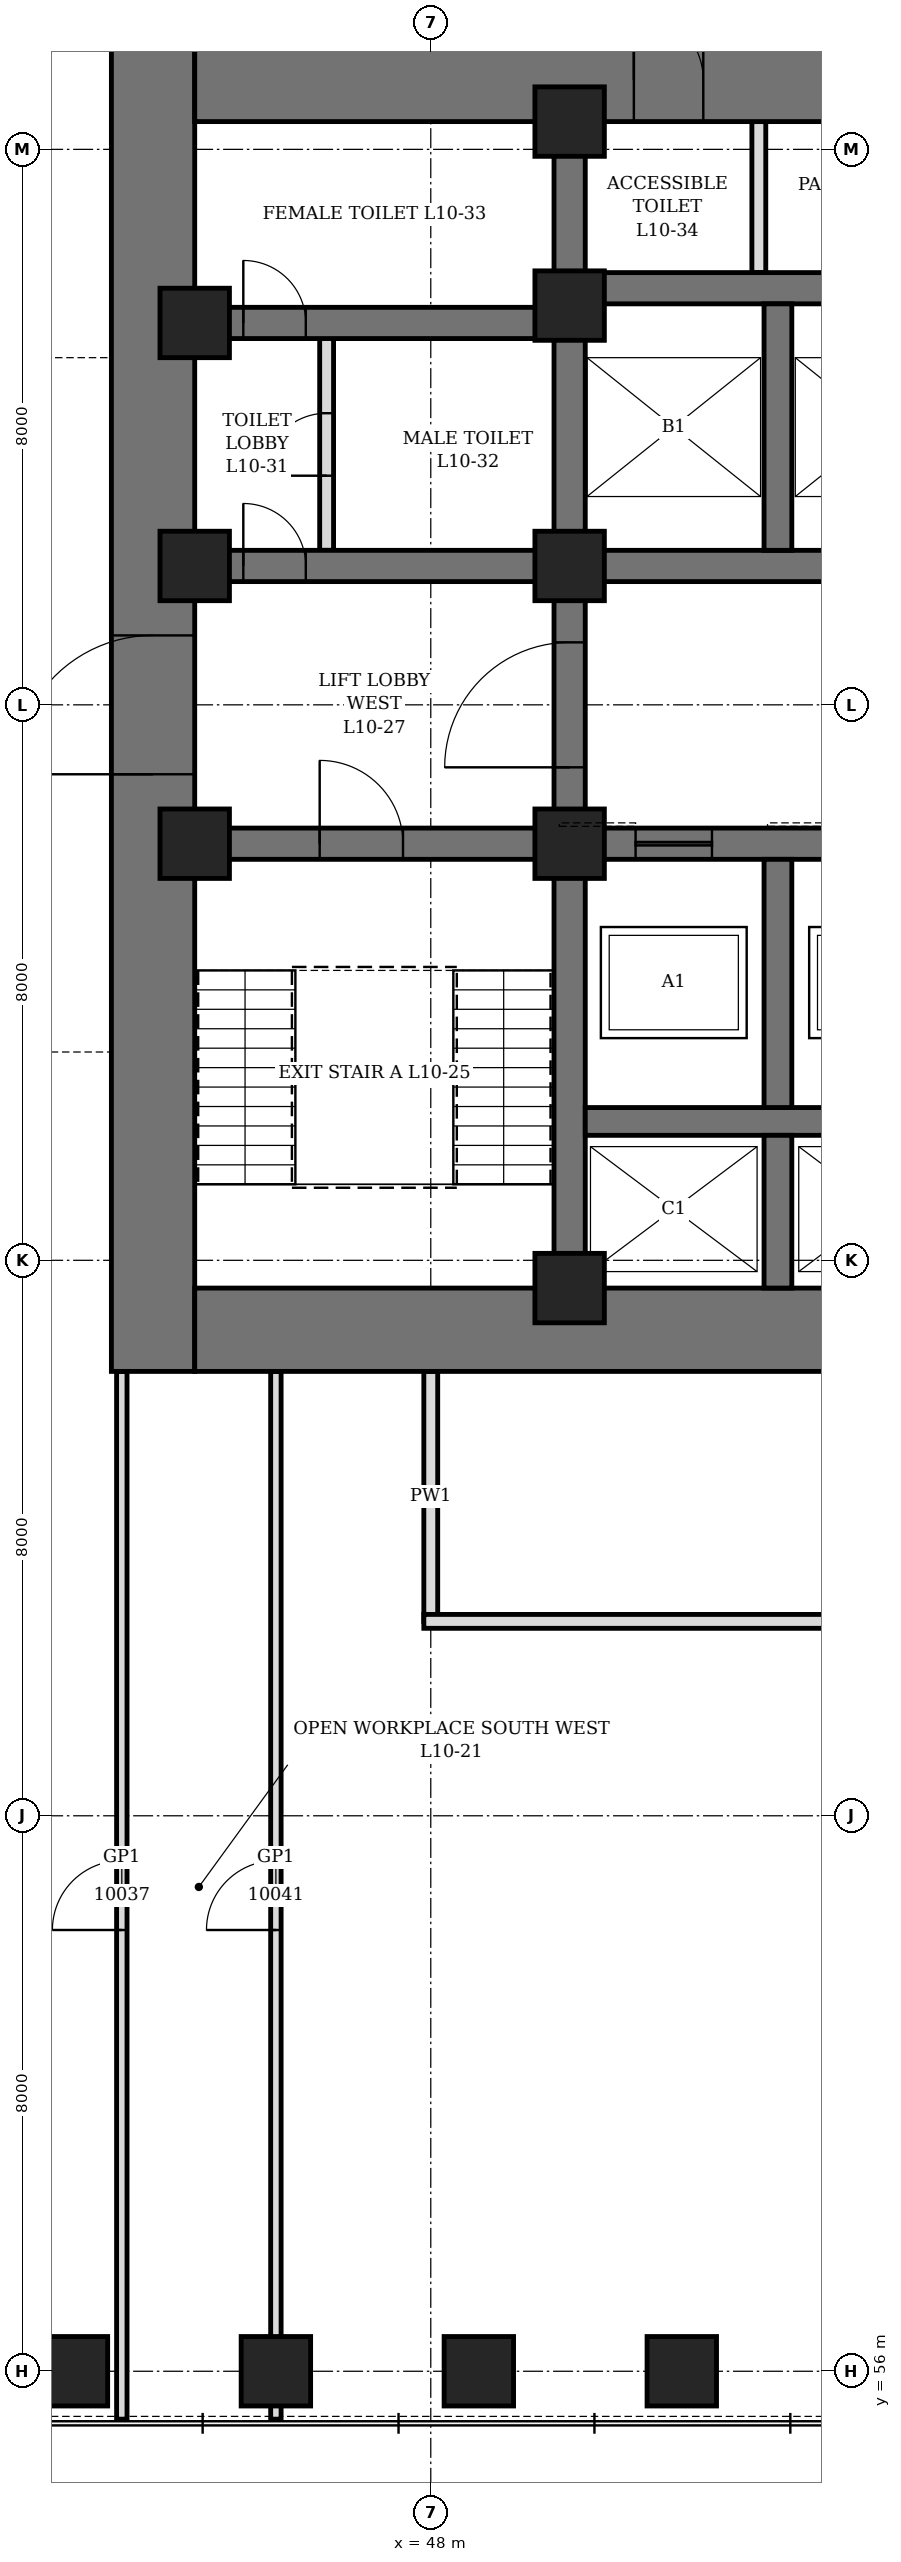
"""IFC4 building model, lengths in metres.
Left out: names, types, materials, properties, quantities, classifications, styles, units other than length and angle.
Written with IfcOpenShell. Run it as: python <this file> out.ifc"""

import sys

from ifc_helpers import new_model, si_unit, direction, frame, frame_2d, origin, origin_2d, place, context, subcontext, project, spatial, rectangle, hollow_rectangle, extrude, element, fill, save


model = new_model("IFC4")
c1 = context("Model", 3, precision=1e-05, world=origin(), true_north=direction((0.0, 1.0)))
c2 = subcontext(c1, "Body", "Model", "MODEL_VIEW")
j1 = project(units=[si_unit("LENGTHUNIT", "METRE"), si_unit("PLANEANGLEUNIT", "RADIAN")], contexts=[c1])
p1 = place(None, origin())
s1 = spatial("IfcSite", under=j1, at=p1, CompositionType="ELEMENT")
p2 = place(p1, origin())
s2 = spatial("IfcBuilding", under=s1, at=p2, CompositionType="ELEMENT")
p3 = place(p2, frame((0.0, 0.0, 51.7)))
s3 = spatial("IfcBuildingStorey", under=s2, at=p3, CompositionType="ELEMENT", Elevation=51.7)
for number, where, z_axis, x_axis in (
    (1, (42.846, 56.0, 0.0), (0.0, 0.0, 1.0), (1.0, 0.0, 0.0)),
    (2, (45.769, 56.0, 0.0), (0.0, 0.0, 1.0), (1.0, 0.0, 0.0)),
    (3, (48.692, 56.0, 0.0), (0.0, 0.0, 1.0), (1.0, 0.0, 0.0)),
    (4, (51.615, 56.0, 0.0), (0.0, 0.0, 1.0), (1.0, 0.0, 0.0)),
):
    element("IfcColumn", number, at=place(p3, frame(where, z_axis=z_axis, x_axis=x_axis)), inside=s3, PredefinedType="COLUMN", context=c2, shape_type="SweptSolid", body=[
        extrude(hollow_rectangle(XDim=1.0, YDim=1.0, WallThickness=0.25, at=origin_2d()), origin(), (0.0, 0.0, 1.0), 4.2),
    ])
p4 = place(p3, frame((44.0, 70.4, 0.0), z_axis=(0.0, 0.0, 1.0), x_axis=(0.0, 1.0, 0.0)))
e5 = element("IfcWall", 5, at=p4, inside=s3, PredefinedType="SHEAR", context=c2, shape_type="SweptSolid", body=[
    extrude(rectangle(XDim=19.2, YDim=1.2, at=frame_2d((9.6, 0.0))), origin(), (0.0, 0.0, 1.0), 4.2),
])
p5 = place(p4, frame((8.6, 0.0, 0.0)))
e6 = element("IfcOpeningElement", 6, at=p5, cuts=e5, PredefinedType="OPENING", context=c2, shape_type="SweptSolid", body=[
    extrude(rectangle(XDim=2.0, YDim=2.4, at=frame_2d((1.0, 1.2))), frame((0.0, 0.61, 0.0), z_axis=(0.0, -1.0, 0.0), x_axis=(1.0, 0.0, 0.0)), (0.0, 0.0, 1.0), 1.22),
])
p6 = place(p3, frame((44.6, 71.0, 0.0), z_axis=(0.0, 0.0, 1.0), x_axis=(1.0, 0.0, 0.0)))
e7 = element("IfcWall", 7, at=p6, inside=s3, PredefinedType="SHEAR", context=c2, shape_type="SweptSolid", body=[
    extrude(rectangle(XDim=22.8, YDim=1.2, at=frame_2d((11.4, 0.0))), origin(), (0.0, 0.0, 1.0), 4.2),
])
p7 = place(p3, frame((44.6, 89.0, 0.0), z_axis=(0.0, 0.0, 1.0), x_axis=(1.0, 0.0, 0.0)))
e8 = element("IfcWall", 8, at=p7, inside=s3, PredefinedType="SHEAR", context=c2, shape_type="SweptSolid", body=[
    extrude(rectangle(XDim=22.8, YDim=1.2, at=frame_2d((11.4, 0.0))), origin(), (0.0, 0.0, 1.0), 4.2),
])
p8 = place(p7, frame((6.325, 0.0, 0.0)))
e9 = element("IfcOpeningElement", 9, at=p8, cuts=e8, PredefinedType="OPENING", context=c2, shape_type="SweptSolid", body=[
    extrude(rectangle(XDim=1.0, YDim=2.1, at=frame_2d((0.5, 1.05))), frame((0.0, 0.61, 0.0), z_axis=(0.0, -1.0, 0.0), x_axis=(1.0, 0.0, 0.0)), (0.0, 0.0, 1.0), 1.22),
])
p9 = place(p7, frame((9.25, 0.0, 0.0)))
e10 = element("IfcOpeningElement", 10, at=p9, cuts=e8, PredefinedType="OPENING", context=c2, shape_type="SweptSolid", body=[
    extrude(rectangle(XDim=0.9, YDim=2.1, at=frame_2d((0.45, 1.05))), frame((0.0, 0.61, 0.0), z_axis=(0.0, -1.0, 0.0), x_axis=(1.0, 0.0, 0.0)), (0.0, 0.0, 1.0), 1.22),
])
p10 = place(p7, frame((12.025, 0.0, 0.0)))
e11 = element("IfcOpeningElement", 11, at=p10, cuts=e8, PredefinedType="OPENING", context=c2, shape_type="SweptSolid", body=[
    extrude(rectangle(XDim=0.9, YDim=2.1, at=frame_2d((0.45, 1.05))), frame((0.0, 0.61, 0.0), z_axis=(0.0, -1.0, 0.0), x_axis=(1.0, 0.0, 0.0)), (0.0, 0.0, 1.0), 1.22),
])
p11 = place(p7, frame((13.962, 0.0, 0.0)))
e12 = element("IfcOpeningElement", 12, at=p11, cuts=e8, PredefinedType="OPENING", context=c2, shape_type="SweptSolid", body=[
    extrude(rectangle(XDim=0.9, YDim=2.1, at=frame_2d((0.45, 1.05))), frame((0.0, 0.61, 0.0), z_axis=(0.0, -1.0, 0.0), x_axis=(1.0, 0.0, 0.0)), (0.0, 0.0, 1.0), 1.22),
])
p12 = place(p3, frame((50.0, 71.6, 0.0), z_axis=(0.0, 0.0, 1.0), x_axis=(0.0, 1.0, 0.0)))
e13 = element("IfcWall", 13, at=p12, inside=s3, PredefinedType="SHEAR", context=c2, shape_type="SweptSolid", body=[
    extrude(rectangle(XDim=16.8, YDim=0.45, at=frame_2d((8.4, 0.0))), origin(), (0.0, 0.0, 1.0), 4.2),
])
p13 = place(p12, frame((7.5, 0.0, 0.0)))
e14 = element("IfcOpeningElement", 14, at=p13, cuts=e13, PredefinedType="OPENING", context=c2, shape_type="SweptSolid", body=[
    extrude(rectangle(XDim=1.8, YDim=2.4, at=frame_2d((0.9, 1.2))), frame((0.0, 0.235, 0.0), z_axis=(0.0, -1.0, 0.0), x_axis=(1.0, 0.0, 0.0)), (0.0, 0.0, 1.0), 0.47),
])
p14 = place(p3, frame((44.6, 78.0, 0.0), z_axis=(0.0, 0.0, 1.0), x_axis=(1.0, 0.0, 0.0)))
e15 = element("IfcWall", 15, at=p14, inside=s3, PredefinedType="SHEAR", context=c2, shape_type="SweptSolid", body=[
    extrude(rectangle(XDim=5.175, YDim=0.45, at=frame_2d((2.587, 0.0))), origin(), (0.0, 0.0, 1.0), 4.2),
])
p15 = place(p14, frame((1.8, 0.0, 0.0)))
e16 = element("IfcOpeningElement", 16, at=p15, cuts=e15, PredefinedType="OPENING", context=c2, shape_type="SweptSolid", body=[
    extrude(rectangle(XDim=1.2, YDim=2.1, at=frame_2d((0.6, 1.05))), frame((0.0, 0.235, 0.0), z_axis=(0.0, -1.0, 0.0), x_axis=(1.0, 0.0, 0.0)), (0.0, 0.0, 1.0), 0.47),
])
p16 = place(p3, frame((44.6, 82.0, 0.0), z_axis=(0.0, 0.0, 1.0), x_axis=(1.0, 0.0, 0.0)))
e17 = element("IfcWall", 17, at=p16, inside=s3, PredefinedType="SHEAR", context=c2, shape_type="SweptSolid", body=[
    extrude(rectangle(XDim=5.175, YDim=0.45, at=frame_2d((2.587, 0.0))), origin(), (0.0, 0.0, 1.0), 4.2),
])
p17 = place(p16, frame((0.7, 0.0, 0.0)))
e18 = element("IfcOpeningElement", 18, at=p17, cuts=e17, PredefinedType="OPENING", context=c2, shape_type="SweptSolid", body=[
    extrude(rectangle(XDim=0.9, YDim=2.1, at=frame_2d((0.45, 1.05))), frame((0.0, 0.235, 0.0), z_axis=(0.0, -1.0, 0.0), x_axis=(1.0, 0.0, 0.0)), (0.0, 0.0, 1.0), 0.47),
])
p18 = place(p3, frame((44.6, 85.5, 0.0), z_axis=(0.0, 0.0, 1.0), x_axis=(1.0, 0.0, 0.0)))
e19 = element("IfcWall", 19, at=p18, inside=s3, PredefinedType="SHEAR", context=c2, shape_type="SweptSolid", body=[
    extrude(rectangle(XDim=5.175, YDim=0.45, at=frame_2d((2.587, 0.0))), origin(), (0.0, 0.0, 1.0), 4.2),
])
p19 = place(p18, frame((0.7, 0.0, 0.0)))
e20 = element("IfcOpeningElement", 20, at=p19, cuts=e19, PredefinedType="OPENING", context=c2, shape_type="SweptSolid", body=[
    extrude(rectangle(XDim=0.9, YDim=2.1, at=frame_2d((0.45, 1.05))), frame((0.0, 0.235, 0.0), z_axis=(0.0, -1.0, 0.0), x_axis=(1.0, 0.0, 0.0)), (0.0, 0.0, 1.0), 0.47),
])
p20 = place(p3, frame((50.225, 78.0, 0.0), z_axis=(0.0, 0.0, 1.0), x_axis=(1.0, 0.0, 0.0)))
e21 = element("IfcWall", 21, at=p20, inside=s3, PredefinedType="SHEAR", context=c2, shape_type="SweptSolid", body=[
    extrude(rectangle(XDim=11.55, YDim=0.45, at=frame_2d((5.775, 0.0))), origin(), (0.0, 0.0, 1.0), 4.2),
])
p21 = place(p20, frame((0.725, 0.0, 0.0)))
e22 = element("IfcOpeningElement", 22, at=p21, cuts=e21, PredefinedType="OPENING", context=c2, shape_type="SweptSolid", body=[
    extrude(rectangle(XDim=1.1, YDim=2.2, at=frame_2d((0.55, 1.1))), frame((0.0, 0.235, 0.0), z_axis=(0.0, -1.0, 0.0), x_axis=(1.0, 0.0, 0.0)), (0.0, 0.0, 1.0), 0.47),
])
p22 = place(p20, frame((3.725, 0.0, 0.0)))
e23 = element("IfcOpeningElement", 23, at=p22, cuts=e21, PredefinedType="OPENING", context=c2, shape_type="SweptSolid", body=[
    extrude(rectangle(XDim=1.1, YDim=2.2, at=frame_2d((0.55, 1.1))), frame((0.0, 0.235, 0.0), z_axis=(0.0, -1.0, 0.0), x_axis=(1.0, 0.0, 0.0)), (0.0, 0.0, 1.0), 0.47),
])
p23 = place(p20, frame((6.725, 0.0, 0.0)))
e24 = element("IfcOpeningElement", 24, at=p23, cuts=e21, PredefinedType="OPENING", context=c2, shape_type="SweptSolid", body=[
    extrude(rectangle(XDim=1.1, YDim=2.2, at=frame_2d((0.55, 1.1))), frame((0.0, 0.235, 0.0), z_axis=(0.0, -1.0, 0.0), x_axis=(1.0, 0.0, 0.0)), (0.0, 0.0, 1.0), 0.47),
])
p24 = place(p20, frame((9.725, 0.0, 0.0)))
e25 = element("IfcOpeningElement", 25, at=p24, cuts=e21, PredefinedType="OPENING", context=c2, shape_type="SweptSolid", body=[
    extrude(rectangle(XDim=1.1, YDim=2.2, at=frame_2d((0.55, 1.1))), frame((0.0, 0.235, 0.0), z_axis=(0.0, -1.0, 0.0), x_axis=(1.0, 0.0, 0.0)), (0.0, 0.0, 1.0), 0.47),
])
for number, where, z_axis, x_axis in (
    (26, (50.225, 82.0, 0.0), (0.0, 0.0, 1.0), (1.0, 0.0, 0.0)),
    (27, (50.225, 86.0, 0.0), (0.0, 0.0, 1.0), (1.0, 0.0, 0.0)),
):
    element("IfcWall", number, at=place(p3, frame(where, z_axis=z_axis, x_axis=x_axis)), inside=s3, PredefinedType="SHEAR", context=c2, shape_type="SweptSolid", body=[
        extrude(rectangle(XDim=11.55, YDim=0.45, at=frame_2d((5.775, 0.0))), origin(), (0.0, 0.0, 1.0), 4.2),
    ])
p25 = place(p3, frame((50.225, 74.0, 0.0), z_axis=(0.0, 0.0, 1.0), x_axis=(1.0, 0.0, 0.0)))
e28 = element("IfcWall", 28, at=p25, inside=s3, PredefinedType="SHEAR", context=c2, shape_type="SweptSolid", body=[
    extrude(rectangle(XDim=11.55, YDim=0.4, at=frame_2d((5.775, 0.0))), origin(), (0.0, 0.0, 1.0), 4.2),
])
p26 = place(p3, frame((53.0, 71.6, 0.0), z_axis=(0.0, 0.0, 1.0), x_axis=(0.0, 1.0, 0.0)))
e29 = element("IfcWall", 29, at=p26, inside=s3, PredefinedType="SHEAR", context=c2, shape_type="SweptSolid", body=[
    extrude(rectangle(XDim=2.2, YDim=0.4, at=frame_2d((1.1, 0.0))), origin(), (0.0, 0.0, 1.0), 4.2),
])
p27 = place(p3, frame((53.0, 74.2, 0.0), z_axis=(0.0, 0.0, 1.0), x_axis=(0.0, 1.0, 0.0)))
e30 = element("IfcWall", 30, at=p27, inside=s3, PredefinedType="SHEAR", context=c2, shape_type="SweptSolid", body=[
    extrude(rectangle(XDim=3.575, YDim=0.4, at=frame_2d((1.788, 0.0))), origin(), (0.0, 0.0, 1.0), 4.2),
])
p28 = place(p3, frame((53.0, 82.225, 0.0), z_axis=(0.0, 0.0, 1.0), x_axis=(0.0, 1.0, 0.0)))
e31 = element("IfcWall", 31, at=p28, inside=s3, PredefinedType="SHEAR", context=c2, shape_type="SweptSolid", body=[
    extrude(rectangle(XDim=3.55, YDim=0.4, at=frame_2d((1.775, 0.0))), origin(), (0.0, 0.0, 1.0), 4.2),
])
for number, where, z_axis, x_axis in (
    (32, (44.6, 78.0, 0.0), (0.0, 0.0, 1.0), (1.0, 0.0, 0.0)),
    (33, (44.6, 82.0, 0.0), (0.0, 0.0, 1.0), (1.0, 0.0, 0.0)),
    (34, (44.6, 85.5, 0.0), (0.0, 0.0, 1.0), (1.0, 0.0, 0.0)),
    (35, (50.0, 71.6, 0.0), (0.0, 0.0, 1.0), (1.0, 0.0, 0.0)),
    (36, (50.0, 78.0, 0.0), (0.0, 0.0, 1.0), (1.0, 0.0, 0.0)),
    (37, (50.0, 82.0, 0.0), (0.0, 0.0, 1.0), (1.0, 0.0, 0.0)),
    (38, (50.0, 85.75, 0.0), (0.0, 0.0, 1.0), (1.0, 0.0, 0.0)),
    (39, (50.0, 88.4, 0.0), (0.0, 0.0, 1.0), (1.0, 0.0, 0.0)),
):
    element("IfcColumn", number, at=place(p3, frame(where, z_axis=z_axis, x_axis=x_axis)), inside=s3, PredefinedType="COLUMN", context=c2, shape_type="SweptSolid", body=[
        extrude(hollow_rectangle(XDim=1.0, YDim=1.0, WallThickness=0.15, at=origin_2d()), origin(), (0.0, 0.0, 1.0), 4.2),
    ])
p29 = place(p3, frame((46.5, 82.225, 0.0), z_axis=(0.0, 0.0, 1.0), x_axis=(0.0, 1.0, 0.0)))
e40 = element("IfcWall", 40, at=p29, inside=s3, PredefinedType="PARTITIONING", context=c2, shape_type="SweptSolid", body=[
    extrude(rectangle(XDim=3.05, YDim=0.2, at=frame_2d((1.525, 0.0))), origin(), (0.0, 0.0, 1.0), 4.04),
])
p30 = place(p29, frame((1.075, 0.0, 0.0)))
e41 = element("IfcOpeningElement", 41, at=p30, cuts=e40, PredefinedType="OPENING", context=c2, shape_type="SweptSolid", body=[
    extrude(rectangle(XDim=0.9, YDim=2.1, at=frame_2d((0.45, 1.05))), frame((0.0, 0.11, 0.0), z_axis=(0.0, -1.0, 0.0), x_axis=(1.0, 0.0, 0.0)), (0.0, 0.0, 1.0), 0.22),
])
p31 = place(p3, frame((52.725, 86.225, 0.0), z_axis=(0.0, 0.0, 1.0), x_axis=(0.0, 1.0, 0.0)))
e42 = element("IfcWall", 42, at=p31, inside=s3, PredefinedType="PARTITIONING", context=c2, shape_type="SweptSolid", body=[
    extrude(rectangle(XDim=2.175, YDim=0.2, at=frame_2d((1.087, 0.0))), origin(), (0.0, 0.0, 1.0), 4.04),
])
p32 = place(p3, frame((48.0, 66.8, 0.0), z_axis=(0.0, 0.0, 1.0), x_axis=(0.0, 1.0, 0.0)))
e43 = element("IfcWall", 43, at=p32, inside=s3, PredefinedType="PARTITIONING", context=c2, shape_type="SweptSolid", body=[
    extrude(rectangle(XDim=3.6, YDim=0.2, at=frame_2d((1.8, 0.0))), origin(), (0.0, 0.0, 1.0), 4.04),
])
p33 = place(p3, frame((47.9, 66.8, 0.0), z_axis=(0.0, 0.0, 1.0), x_axis=(1.0, 0.0, 0.0)))
e44 = element("IfcWall", 44, at=p33, inside=s3, PredefinedType="PARTITIONING", context=c2, shape_type="SweptSolid", body=[
    extrude(rectangle(XDim=16.2, YDim=0.2, at=frame_2d((8.1, 0.0))), origin(), (0.0, 0.0, 1.0), 4.04),
])
p34 = place(p33, frame((7.6, 0.0, 0.0)))
e45 = element("IfcOpeningElement", 45, at=p34, cuts=e44, PredefinedType="OPENING", context=c2, shape_type="SweptSolid", body=[
    extrude(rectangle(XDim=1.0, YDim=2.1, at=frame_2d((0.5, 1.05))), frame((0.0, 0.11, 0.0), z_axis=(0.0, -1.0, 0.0), x_axis=(1.0, 0.0, 0.0)), (0.0, 0.0, 1.0), 0.22),
])
p35 = place(p3, frame((43.55, 55.31, 0.0), z_axis=(0.0, 0.0, 1.0), x_axis=(0.0, 1.0, 0.0)))
e46 = element("IfcWall", 46, at=p35, inside=s3, PredefinedType="PARTITIONING", context=c2, shape_type="SweptSolid", body=[
    extrude(rectangle(XDim=15.09, YDim=0.15, at=frame_2d((7.545, 0.0))), origin(), (0.0, 0.0, 1.0), 4.04),
])
p36 = place(p35, frame((7.045, 0.0, 0.0)))
e47 = element("IfcOpeningElement", 47, at=p36, cuts=e46, PredefinedType="OPENING", context=c2, shape_type="SweptSolid", body=[
    extrude(rectangle(XDim=1.0, YDim=2.4, at=frame_2d((0.5, 1.2))), frame((0.0, 0.085, 0.0), z_axis=(0.0, -1.0, 0.0), x_axis=(1.0, 0.0, 0.0)), (0.0, 0.0, 1.0), 0.17),
])
p37 = place(p3, frame((45.769, 55.31, 0.0), z_axis=(0.0, 0.0, 1.0), x_axis=(0.0, 1.0, 0.0)))
e48 = element("IfcWall", 48, at=p37, inside=s3, PredefinedType="PARTITIONING", context=c2, shape_type="SweptSolid", body=[
    extrude(rectangle(XDim=15.09, YDim=0.15, at=frame_2d((7.545, 0.0))), origin(), (0.0, 0.0, 1.0), 3.278),
])
p38 = place(p37, frame((7.045, 0.0, 0.0)))
e49 = element("IfcOpeningElement", 49, at=p38, cuts=e48, PredefinedType="OPENING", context=c2, shape_type="SweptSolid", body=[
    extrude(rectangle(XDim=1.0, YDim=2.4, at=frame_2d((0.5, 1.2))), frame((0.0, 0.085, 0.0), z_axis=(0.0, -1.0, 0.0), x_axis=(1.0, 0.0, 0.0)), (0.0, 0.0, 1.0), 0.17),
])
p39 = place(p17, origin())
e50 = element("IfcDoor", 50, at=p39, inside=s3, OperationType="SINGLE_SWING_LEFT", PredefinedType="DOOR", context=c2, shape_type="SweptSolid", body=[
    extrude(rectangle(XDim=0.9, YDim=2.1, at=frame_2d((0.45, 1.05))), frame((0.0, 0.225, 0.0), z_axis=(0.0, -1.0, 0.0), x_axis=(1.0, 0.0, 0.0)), (0.0, 0.0, 1.0), 0.449),
])
fill(e18, e50)
p40 = place(p30, origin())
e51 = element("IfcDoor", 51, at=p40, inside=s3, OperationType="SINGLE_SWING_RIGHT", PredefinedType="DOOR", context=c2, shape_type="SweptSolid", body=[
    extrude(rectangle(XDim=0.9, YDim=2.1, at=frame_2d((0.45, 1.05))), frame((0.0, 0.1, 0.0), z_axis=(0.0, -1.0, 0.0), x_axis=(1.0, 0.0, 0.0)), (0.0, 0.0, 1.0), 0.199),
])
fill(e41, e51)
p41 = place(p19, origin())
e52 = element("IfcDoor", 52, at=p41, inside=s3, OperationType="SINGLE_SWING_RIGHT", PredefinedType="DOOR", context=c2, shape_type="SweptSolid", body=[
    extrude(rectangle(XDim=0.9, YDim=2.1, at=frame_2d((0.45, 1.05))), frame((0.0, 0.225, 0.0), z_axis=(0.0, -1.0, 0.0), x_axis=(1.0, 0.0, 0.0)), (0.0, 0.0, 1.0), 0.449),
])
fill(e20, e52)
p42 = place(p8, origin())
e53 = element("IfcDoor", 53, at=p42, inside=s3, OperationType="SINGLE_SWING_LEFT", PredefinedType="DOOR", context=c2, shape_type="SweptSolid", body=[
    extrude(rectangle(XDim=1.0, YDim=2.1, at=frame_2d((0.5, 1.05))), frame((0.0, 0.35, 0.0), z_axis=(0.0, -1.0, 0.0), x_axis=(1.0, 0.0, 0.0)), (0.0, 0.0, 1.0), 0.7),
])
fill(e9, e53)
p43 = place(p15, origin())
e54 = element("IfcDoor", 54, at=p43, inside=s3, OperationType="SINGLE_SWING_LEFT", PredefinedType="DOOR", context=c2, shape_type="SweptSolid", body=[
    extrude(rectangle(XDim=1.2, YDim=2.1, at=frame_2d((0.6, 1.05))), frame((0.0, 0.225, 0.0), z_axis=(0.0, -1.0, 0.0), x_axis=(1.0, 0.0, 0.0)), (0.0, 0.0, 1.0), 0.449),
])
fill(e16, e54)
p44 = place(p5, origin())
e55 = element("IfcDoor", 55, at=p44, inside=s3, OperationType="DOUBLE_DOOR_SINGLE_SWING", PredefinedType="DOOR", context=c2, shape_type="SweptSolid", body=[
    extrude(rectangle(XDim=2.0, YDim=2.4, at=frame_2d((1.0, 1.2))), frame((0.0, 0.35, 0.0), z_axis=(0.0, -1.0, 0.0), x_axis=(1.0, 0.0, 0.0)), (0.0, 0.0, 1.0), 0.7),
])
fill(e6, e55)
p45 = place(p13, origin())
e56 = element("IfcDoor", 56, at=p45, inside=s3, OperationType="DOUBLE_DOOR_SINGLE_SWING", PredefinedType="DOOR", context=c2, shape_type="SweptSolid", body=[
    extrude(rectangle(XDim=1.8, YDim=2.4, at=frame_2d((0.9, 1.2))), frame((0.0, 0.225, 0.0), z_axis=(0.0, -1.0, 0.0), x_axis=(1.0, 0.0, 0.0)), (0.0, 0.0, 1.0), 0.449),
])
fill(e14, e56)
p46 = place(p21, origin())
e57 = element("IfcDoor", 57, at=p46, inside=s3, OperationType="SLIDING_TO_LEFT", PredefinedType="DOOR", context=c2, shape_type="SweptSolid", body=[
    extrude(rectangle(XDim=1.1, YDim=2.2, at=frame_2d((0.55, 1.1))), frame((0.0, 0.225, 0.0), z_axis=(0.0, -1.0, 0.0), x_axis=(1.0, 0.0, 0.0)), (0.0, 0.0, 1.0), 0.449),
])
fill(e22, e57)
p47 = place(p36, origin())
e58 = element("IfcDoor", 58, at=p47, inside=s3, OperationType="SINGLE_SWING_RIGHT", PredefinedType="DOOR", context=c2, shape_type="SweptSolid", body=[
    extrude(rectangle(XDim=1.0, YDim=2.4, at=frame_2d((0.5, 1.2))), frame((0.0, 0.075, 0.0), z_axis=(0.0, -1.0, 0.0), x_axis=(1.0, 0.0, 0.0)), (0.0, 0.0, 1.0), 0.149),
])
fill(e47, e58)
p48 = place(p38, origin())
e59 = element("IfcDoor", 59, at=p48, inside=s3, OperationType="SINGLE_SWING_RIGHT", PredefinedType="DOOR", context=c2, shape_type="SweptSolid", body=[
    extrude(rectangle(XDim=1.0, YDim=2.4, at=frame_2d((0.5, 1.2))), frame((0.0, 0.075, 0.0), z_axis=(0.0, -1.0, 0.0), x_axis=(1.0, 0.0, 0.0)), (0.0, 0.0, 1.0), 0.149),
])
fill(e49, e59)
save(model, sys.argv[1])
